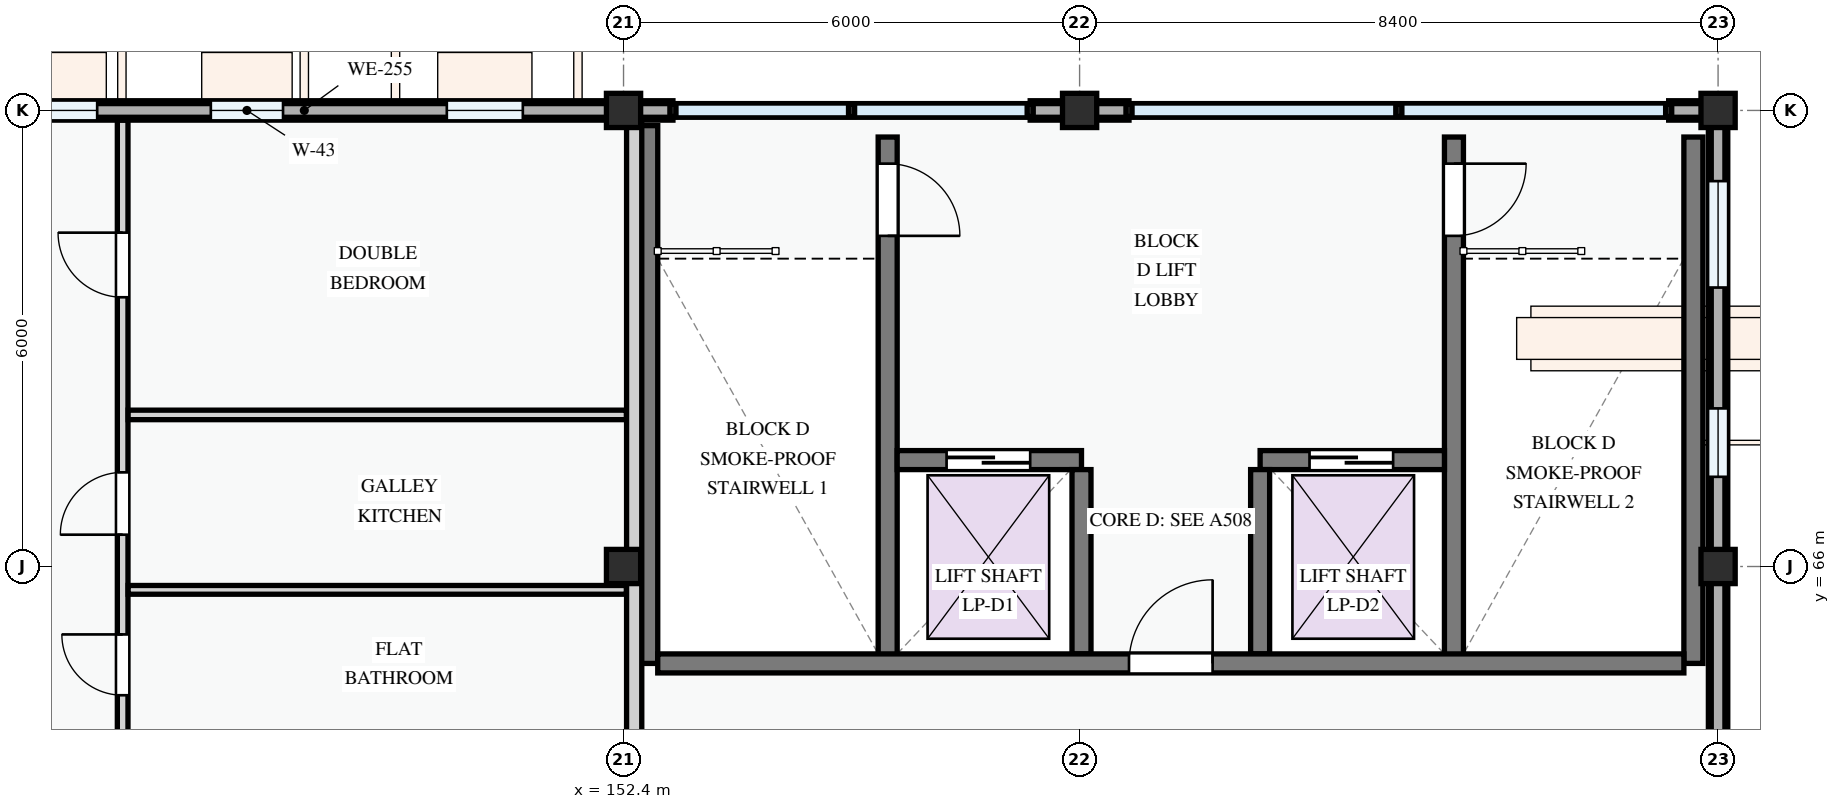
"""IFC4 building model, lengths in metres.
Left out: names, types, materials, properties, quantities, classifications, styles, units other than length and angle.
Written with IfcOpenShell. Run it as: python <this file> out.ifc"""

import sys

from ifc_helpers import new_model, si_unit, direction, frame, frame_2d, origin, origin_2d, place, context, subcontext, project, spatial, polyline, rectangle, outline, extrude, element, fill, save


model = new_model("IFC4")
c1 = context("Model", 3, precision=1e-05, world=origin(), true_north=direction((0.0, 1.0)))
c2 = subcontext(c1, "Body", "Model", "MODEL_VIEW")
j1 = project(units=[si_unit("LENGTHUNIT", "METRE"), si_unit("PLANEANGLEUNIT", "RADIAN")], contexts=[c1])
p1 = place(None, origin())
s1 = spatial("IfcSite", under=j1, at=p1, CompositionType="ELEMENT")
p2 = place(p1, origin())
s2 = spatial("IfcBuilding", under=s1, at=p2, CompositionType="ELEMENT")
p3 = place(p2, frame((0.0, 0.0, 27.9)))
s3 = spatial("IfcBuildingStorey", under=s2, at=p3, CompositionType="ELEMENT", Elevation=27.9)
for number, where, z_axis, x_axis in (
    (1, (152.4, 66.0, 0.0), (0.0, 0.0, 1.0), (1.0, 0.0, 0.0)),
    (2, (152.4, 72.0, 0.0), (0.0, 0.0, 1.0), (1.0, 0.0, 0.0)),
    (3, (158.4, 72.0, 0.0), (0.0, 0.0, 1.0), (1.0, 0.0, 0.0)),
    (4, (166.8, 66.0, 0.0), (0.0, 0.0, 1.0), (1.0, 0.0, 0.0)),
    (5, (166.8, 72.0, 0.0), (0.0, 0.0, 1.0), (1.0, 0.0, 0.0)),
):
    element("IfcColumn", number, at=place(p3, frame(where, z_axis=z_axis, x_axis=x_axis)), inside=s3, PredefinedType="COLUMN", context=c2, shape_type="SweptSolid", body=[
        extrude(rectangle(XDim=0.45, YDim=0.45, at=origin_2d()), origin(), (0.0, 0.0, 1.0), 3.3),
    ])
p4 = place(p3, frame((152.4, 72.0, 0.0), z_axis=(0.0, 0.0, 1.0), x_axis=(-1.0, 0.0, 0.0)))
e6 = element("IfcWall", 6, at=p4, inside=s3, PredefinedType="STANDARD", context=c2, shape_type="SweptSolid", body=[
    extrude(rectangle(XDim=8.4, YDim=0.255, at=frame_2d((4.2, 0.0))), origin(), (0.0, 0.0, 1.0), 2.375),
])
p5 = place(p4, frame((1.325, 0.0, 0.78)))
e7 = element("IfcOpeningElement", 7, at=p5, cuts=e6, PredefinedType="OPENING", context=c2, shape_type="SweptSolid", body=[
    extrude(rectangle(XDim=1.0, YDim=1.25, at=frame_2d((0.5, 0.625))), frame((0.0, 0.137, 0.0), z_axis=(0.0, -1.0, 0.0), x_axis=(1.0, 0.0, 0.0)), (0.0, 0.0, 1.0), 0.275),
])
p6 = place(p4, frame((4.48, 0.0, 0.78)))
e8 = element("IfcOpeningElement", 8, at=p6, cuts=e6, PredefinedType="OPENING", context=c2, shape_type="SweptSolid", body=[
    extrude(rectangle(XDim=0.95, YDim=1.15, at=frame_2d((0.475, 0.575))), frame((0.0, 0.137, 0.0), z_axis=(0.0, -1.0, 0.0), x_axis=(1.0, 0.0, 0.0)), (0.0, 0.0, 1.0), 0.275),
])
p7 = place(p4, frame((6.925, 0.0, 0.78)))
e9 = element("IfcOpeningElement", 9, at=p7, cuts=e6, PredefinedType="OPENING", context=c2, shape_type="SweptSolid", body=[
    extrude(rectangle(XDim=0.95, YDim=1.15, at=frame_2d((0.475, 0.575))), frame((0.0, 0.137, 0.0), z_axis=(0.0, -1.0, 0.0), x_axis=(1.0, 0.0, 0.0)), (0.0, 0.0, 1.0), 0.275),
])
p8 = place(p3, frame((166.8, 57.6, 0.0), z_axis=(0.0, 0.0, 1.0), x_axis=(0.0, 1.0, 0.0)))
e10 = element("IfcWall", 10, at=p8, inside=s3, PredefinedType="STANDARD", context=c2, shape_type="SweptSolid", body=[
    extrude(rectangle(XDim=8.4, YDim=0.255, at=frame_2d((4.2, 0.0))), origin(), (0.0, 0.0, 1.0), 2.345),
])
p9 = place(p8, frame((1.745, 0.0, 0.78)))
e11 = element("IfcOpeningElement", 11, at=p9, cuts=e10, PredefinedType="OPENING", context=c2, shape_type="SweptSolid", body=[
    extrude(rectangle(XDim=0.9, YDim=1.2, at=frame_2d((0.45, 0.6))), frame((0.0, 0.137, 0.0), z_axis=(0.0, -1.0, 0.0), x_axis=(1.0, 0.0, 0.0)), (0.0, 0.0, 1.0), 0.275),
])
p10 = place(p8, frame((5.188, 0.0, 0.78)))
e12 = element("IfcOpeningElement", 12, at=p10, cuts=e10, PredefinedType="OPENING", context=c2, shape_type="SweptSolid", body=[
    extrude(rectangle(XDim=0.95, YDim=1.15, at=frame_2d((0.475, 0.575))), frame((0.0, 0.137, 0.0), z_axis=(0.0, -1.0, 0.0), x_axis=(1.0, 0.0, 0.0)), (0.0, 0.0, 1.0), 0.275),
])
p11 = place(p3, frame((166.8, 66.0, 0.0), z_axis=(0.0, 0.0, 1.0), x_axis=(0.0, 1.0, 0.0)))
e13 = element("IfcWall", 13, at=p11, inside=s3, PredefinedType="STANDARD", context=c2, shape_type="SweptSolid", body=[
    extrude(rectangle(XDim=6.0, YDim=0.255, at=frame_2d((3.0, 0.0))), origin(), (0.0, 0.0, 1.0), 2.445),
])
p12 = place(p11, frame((1.18, 0.0, 0.78)))
e14 = element("IfcOpeningElement", 14, at=p12, cuts=e13, PredefinedType="OPENING", context=c2, shape_type="SweptSolid", body=[
    extrude(rectangle(XDim=0.9, YDim=1.2, at=frame_2d((0.45, 0.6))), frame((0.0, 0.137, 0.0), z_axis=(0.0, -1.0, 0.0), x_axis=(1.0, 0.0, 0.0)), (0.0, 0.0, 1.0), 0.275),
])
p13 = place(p11, frame((3.67, 0.0, 0.78)))
e15 = element("IfcOpeningElement", 15, at=p13, cuts=e13, PredefinedType="OPENING", context=c2, shape_type="SweptSolid", body=[
    extrude(rectangle(XDim=1.4, YDim=1.45, at=frame_2d((0.7, 0.725))), frame((0.0, 0.137, 0.0), z_axis=(0.0, -1.0, 0.0), x_axis=(1.0, 0.0, 0.0)), (0.0, 0.0, 1.0), 0.275),
])
p14 = place(p3, frame((166.67, 72.0, 0.0), z_axis=(0.0, 0.0, 1.0), x_axis=(-1.0, 0.0, 0.0)))
e16 = element("IfcWall", 16, at=p14, inside=s3, PredefinedType="STANDARD", context=c2, shape_type="SweptSolid", body=[
    extrude(rectangle(XDim=0.521, YDim=0.255, at=frame_2d((0.26, 0.0))), origin(), (0.0, 0.0, 1.0), 3.04),
])
p15 = place(p3, frame((159.05, 72.0, 0.0), z_axis=(0.0, 0.0, 1.0), x_axis=(-1.0, 0.0, 0.0)))
e17 = element("IfcWall", 17, at=p15, inside=s3, PredefinedType="STANDARD", context=c2, shape_type="SweptSolid", body=[
    extrude(rectangle(XDim=0.65, YDim=0.255, at=frame_2d((0.325, 0.0))), origin(), (0.0, 0.0, 1.0), 3.04),
])
p16 = place(p3, frame((158.4, 72.0, 0.0), z_axis=(0.0, 0.0, 1.0), x_axis=(-1.0, 0.0, 0.0)))
e18 = element("IfcWall", 18, at=p16, inside=s3, PredefinedType="STANDARD", context=c2, shape_type="SweptSolid", body=[
    extrude(rectangle(XDim=0.65, YDim=0.255, at=frame_2d((0.325, 0.0))), origin(), (0.0, 0.0, 1.0), 3.04),
])
p17 = place(p3, frame((153.05, 72.0, 0.0), z_axis=(0.0, 0.0, 1.0), x_axis=(-1.0, 0.0, 0.0)))
e19 = element("IfcWall", 19, at=p17, inside=s3, PredefinedType="STANDARD", context=c2, shape_type="SweptSolid", body=[
    extrude(rectangle(XDim=0.65, YDim=0.255, at=frame_2d((0.325, 0.0))), origin(), (0.0, 0.0, 1.0), 3.04),
])
p18 = place(p3, frame((152.4, 72.0, 3.3), z_axis=(0.0, 0.0, 1.0), x_axis=(-1.0, 0.0, 0.0)))
e20 = element("IfcWall", 20, at=p18, inside=s3, PredefinedType="PARAPET", context=c2, shape_type="SweptSolid", body=[
    extrude(rectangle(XDim=14.4, YDim=0.18, at=frame_2d((7.2, 0.0))), origin(), (0.0, 0.0, 1.0), 1.15),
])
p19 = place(p3, frame((166.8, 57.6, 3.3), z_axis=(0.0, 0.0, 1.0), x_axis=(0.0, 1.0, 0.0)))
e21 = element("IfcWall", 21, at=p19, inside=s3, PredefinedType="PARAPET", context=c2, shape_type="SweptSolid", body=[
    extrude(outline(polyline([(0.0, 0.0), (8.4, 0.0), (8.4, 1.12), (7.7, 1.322), (7.0, 1.484), (6.3, 1.618), (5.6, 1.718), (4.9, 1.779), (4.2, 1.8), (3.5, 1.779), (2.8, 1.718), (2.1, 1.618), (1.4, 1.484), (0.7, 1.322), (0.0, 1.12), (0.0, 0.0)])), frame((0.0, 0.09, 0.0), z_axis=(0.0, -1.0, 0.0), x_axis=(1.0, 0.0, 0.0)), (0.0, 0.0, 1.0), 0.18),
])
p20 = place(p3, frame((166.8, 66.0, 3.3), z_axis=(0.0, 0.0, 1.0), x_axis=(0.0, 1.0, 0.0)))
e22 = element("IfcWall", 22, at=p20, inside=s3, PredefinedType="PARAPET", context=c2, shape_type="SweptSolid", body=[
    extrude(outline(polyline([(0.0, 0.0), (6.0, 0.0), (6.0, 1.12), (5.5, 1.322), (5.0, 1.484), (4.5, 1.618), (4.0, 1.718), (3.5, 1.779), (3.0, 1.8), (2.5, 1.779), (2.0, 1.718), (1.5, 1.618), (1.0, 1.484), (0.5, 1.322), (0.0, 1.12), (0.0, 0.0)])), frame((0.0, 0.09, 0.0), z_axis=(0.0, -1.0, 0.0), x_axis=(1.0, 0.0, 0.0)), (0.0, 0.0, 1.0), 0.18),
])
p21 = place(p3, frame((166.8, 72.0, 3.3), z_axis=(0.0, 0.0, 1.0), x_axis=(-1.0, 0.0, 0.0)))
e23 = element("IfcWall", 23, at=p21, inside=s3, PredefinedType="PARAPET", context=c2, shape_type="SweptSolid", body=[
    extrude(rectangle(XDim=14.4, YDim=0.18, at=frame_2d((7.2, 0.0))), origin(), (0.0, 0.0, 1.0), 1.15),
])
p22 = place(p3, frame((155.875, 71.65, 0.0), z_axis=(0.0, 0.0, 1.0), x_axis=(0.0, -1.0, 0.0)))
e24 = element("IfcWall", 24, at=p22, inside=s3, PredefinedType="SHEAR", context=c2, shape_type="SweptSolid", body=[
    extrude(rectangle(XDim=6.925, YDim=0.25, at=frame_2d((3.462, 0.0))), origin(), (0.0, 0.0, 1.0), 3.0),
])
p23 = place(p22, frame((0.35, 0.0, 0.0)))
e25 = element("IfcOpeningElement", 25, at=p23, cuts=e24, PredefinedType="OPENING", context=c2, shape_type="SweptSolid", body=[
    extrude(rectangle(XDim=0.95, YDim=2.1, at=frame_2d((0.475, 1.05))), frame((0.0, 0.135, 0.0), z_axis=(0.0, -1.0, 0.0), x_axis=(1.0, 0.0, 0.0)), (0.0, 0.0, 1.0), 0.27),
])
p24 = place(p3, frame((152.725, 71.8, 0.0), z_axis=(0.0, 0.0, 1.0), x_axis=(0.0, -1.0, 0.0)))
e26 = element("IfcWall", 26, at=p24, inside=s3, PredefinedType="SHEAR", context=c2, shape_type="SweptSolid", body=[
    extrude(rectangle(XDim=7.075, YDim=0.25, at=frame_2d((3.538, 0.0))), origin(), (0.0, 0.0, 1.0), 3.0),
])
p25 = place(p3, frame((166.475, 71.65, 0.0), z_axis=(0.0, 0.0, 1.0), x_axis=(0.0, -1.0, 0.0)))
e27 = element("IfcWall", 27, at=p25, inside=s3, PredefinedType="SHEAR", context=c2, shape_type="SweptSolid", body=[
    extrude(rectangle(XDim=6.925, YDim=0.25, at=frame_2d((3.462, 0.0))), origin(), (0.0, 0.0, 1.0), 3.0),
])
p26 = place(p3, frame((163.325, 71.65, 0.0), z_axis=(0.0, 0.0, 1.0), x_axis=(0.0, -1.0, 0.0)))
e28 = element("IfcWall", 28, at=p26, inside=s3, PredefinedType="SHEAR", context=c2, shape_type="SweptSolid", body=[
    extrude(rectangle(XDim=6.925, YDim=0.25, at=frame_2d((3.462, 0.0))), origin(), (0.0, 0.0, 1.0), 3.0),
])
p27 = place(p26, frame((0.35, 0.0, 0.0)))
e29 = element("IfcOpeningElement", 29, at=p27, cuts=e28, PredefinedType="OPENING", context=c2, shape_type="SweptSolid", body=[
    extrude(rectangle(XDim=0.95, YDim=2.1, at=frame_2d((0.475, 1.05))), frame((0.0, 0.135, 0.0), z_axis=(0.0, -1.0, 0.0), x_axis=(1.0, 0.0, 0.0)), (0.0, 0.0, 1.0), 0.27),
])
p28 = place(p3, frame((156.0, 67.4, 0.0), z_axis=(0.0, 0.0, 1.0), x_axis=(1.0, 0.0, 0.0)))
e30 = element("IfcWall", 30, at=p28, inside=s3, PredefinedType="SHEAR", context=c2, shape_type="SweptSolid", body=[
    extrude(rectangle(XDim=2.425, YDim=0.25, at=frame_2d((1.212, 0.0))), origin(), (0.0, 0.0, 1.0), 3.0),
])
p29 = place(p28, frame((0.65, 0.0, 0.0)))
e31 = element("IfcOpeningElement", 31, at=p29, cuts=e30, PredefinedType="OPENING", context=c2, shape_type="SweptSolid", body=[
    extrude(rectangle(XDim=1.1, YDim=2.15, at=frame_2d((0.55, 1.075))), frame((0.0, 0.135, 0.0), z_axis=(0.0, -1.0, 0.0), x_axis=(1.0, 0.0, 0.0)), (0.0, 0.0, 1.0), 0.27),
])
p30 = place(p3, frame((160.775, 67.4, 0.0), z_axis=(0.0, 0.0, 1.0), x_axis=(1.0, 0.0, 0.0)))
e32 = element("IfcWall", 32, at=p30, inside=s3, PredefinedType="SHEAR", context=c2, shape_type="SweptSolid", body=[
    extrude(rectangle(XDim=2.425, YDim=0.25, at=frame_2d((1.212, 0.0))), origin(), (0.0, 0.0, 1.0), 3.0),
])
p31 = place(p30, frame((0.65, 0.0, 0.0)))
e33 = element("IfcOpeningElement", 33, at=p31, cuts=e32, PredefinedType="OPENING", context=c2, shape_type="SweptSolid", body=[
    extrude(rectangle(XDim=1.1, YDim=2.15, at=frame_2d((0.55, 1.075))), frame((0.0, 0.135, 0.0), z_axis=(0.0, -1.0, 0.0), x_axis=(1.0, 0.0, 0.0)), (0.0, 0.0, 1.0), 0.27),
])
for number, where, z_axis, x_axis in (
    (34, (158.425, 67.275, 0.0), (0.0, 0.0, 1.0), (0.0, -1.0, 0.0)),
    (35, (160.775, 67.275, 0.0), (0.0, 0.0, 1.0), (0.0, -1.0, 0.0)),
):
    element("IfcWall", number, at=place(p3, frame(where, z_axis=z_axis, x_axis=x_axis)), inside=s3, PredefinedType="SHEAR", context=c2, shape_type="SweptSolid", body=[
        extrude(rectangle(XDim=2.425, YDim=0.25, at=frame_2d((1.212, 0.0))), origin(), (0.0, 0.0, 1.0), 3.0),
    ])
p32 = place(p3, frame((152.85, 64.725, 0.0), z_axis=(0.0, 0.0, 1.0), x_axis=(1.0, 0.0, 0.0)))
e36 = element("IfcWall", 36, at=p32, inside=s3, PredefinedType="SHEAR", context=c2, shape_type="SweptSolid", body=[
    extrude(rectangle(XDim=13.5, YDim=0.25, at=frame_2d((6.75, 0.0))), origin(), (0.0, 0.0, 1.0), 3.0),
])
p33 = place(p32, frame((6.2, 0.0, 0.0)))
e37 = element("IfcOpeningElement", 37, at=p33, cuts=e36, PredefinedType="OPENING", context=c2, shape_type="SweptSolid", body=[
    extrude(rectangle(XDim=1.1, YDim=2.15, at=frame_2d((0.55, 1.075))), frame((0.0, 0.135, 0.0), z_axis=(0.0, -1.0, 0.0), x_axis=(1.0, 0.0, 0.0)), (0.0, 0.0, 1.0), 0.27),
])
p34 = place(p3, frame((145.81, 63.804, 0.0), z_axis=(0.0, 0.0, 1.0), x_axis=(0.0, 1.0, 0.0)))
e38 = element("IfcWall", 38, at=p34, inside=s3, PredefinedType="PARTITIONING", context=c2, shape_type="SweptSolid", body=[
    extrude(rectangle(XDim=8.066, YDim=0.14, at=frame_2d((4.033, 0.0))), origin(), (0.0, 0.0, 1.0), 3.0),
])
p35 = place(p34, frame((0.502, 0.0, 0.0)))
e39 = element("IfcOpeningElement", 39, at=p35, cuts=e38, PredefinedType="OPENING", context=c2, shape_type="SweptSolid", body=[
    extrude(rectangle(XDim=0.8, YDim=2.1, at=frame_2d((0.4, 1.05))), frame((0.0, 0.08, 0.0), z_axis=(0.0, -1.0, 0.0), x_axis=(1.0, 0.0, 0.0)), (0.0, 0.0, 1.0), 0.16),
])
p36 = place(p34, frame((2.614, 0.0, 0.0)))
e40 = element("IfcOpeningElement", 40, at=p36, cuts=e38, PredefinedType="OPENING", context=c2, shape_type="SweptSolid", body=[
    extrude(rectangle(XDim=0.82, YDim=2.08, at=frame_2d((0.41, 1.04))), frame((0.0, 0.08, 0.0), z_axis=(0.0, -1.0, 0.0), x_axis=(1.0, 0.0, 0.0)), (0.0, 0.0, 1.0), 0.16),
])
p37 = place(p34, frame((5.738, 0.0, 0.0)))
e41 = element("IfcOpeningElement", 41, at=p37, cuts=e38, PredefinedType="OPENING", context=c2, shape_type="SweptSolid", body=[
    extrude(rectangle(XDim=0.85, YDim=2.1, at=frame_2d((0.425, 1.05))), frame((0.0, 0.08, 0.0), z_axis=(0.0, -1.0, 0.0), x_axis=(1.0, 0.0, 0.0)), (0.0, 0.0, 1.0), 0.16),
])
p38 = place(p3, frame((145.882, 67.994, 0.0), z_axis=(0.0, 0.0, 1.0), x_axis=(1.0, 0.0, 0.0)))
e42 = element("IfcWall", 42, at=p38, inside=s3, PredefinedType="PARTITIONING", context=c2, shape_type="SweptSolid", body=[
    extrude(rectangle(XDim=6.556, YDim=0.125, at=frame_2d((3.278, 0.0))), origin(), (0.0, 0.0, 1.0), 3.0),
])
p39 = place(p3, frame((145.882, 65.693, 0.0), z_axis=(0.0, 0.0, 1.0), x_axis=(1.0, 0.0, 0.0)))
e43 = element("IfcWall", 43, at=p39, inside=s3, PredefinedType="PARTITIONING", context=c2, shape_type="SweptSolid", body=[
    extrude(rectangle(XDim=6.556, YDim=0.115, at=frame_2d((3.278, 0.0))), origin(), (0.0, 0.0, 1.0), 2.375),
])
p40 = place(p3, frame((152.54, 63.804, 0.0), z_axis=(0.0, 0.0, 1.0), x_axis=(0.0, 1.0, 0.0)))
e44 = element("IfcWall", 44, at=p40, inside=s3, PredefinedType="PARTITIONING", context=c2, shape_type="SweptSolid", body=[
    extrude(rectangle(XDim=8.066, YDim=0.2, at=frame_2d((4.033, 0.0))), origin(), (0.0, 0.0, 1.0), 2.425),
])
p41 = place(p5, origin())
e45 = element("IfcWindow", 45, at=p41, inside=s3, PartitioningType="SINGLE_PANEL", PredefinedType="WINDOW", context=c2, shape_type="SweptSolid", body=[
    extrude(rectangle(XDim=1.0, YDim=1.25, at=frame_2d((0.5, 0.625))), frame((0.0, 0.03, 0.0), z_axis=(0.0, -1.0, 0.0), x_axis=(1.0, 0.0, 0.0)), (0.0, 0.0, 1.0), 0.06),
])
fill(e7, e45)
p42 = place(p6, origin())
e46 = element("IfcWindow", 46, at=p42, inside=s3, PartitioningType="SINGLE_PANEL", PredefinedType="WINDOW", context=c2, shape_type="SweptSolid", body=[
    extrude(rectangle(XDim=0.95, YDim=1.15, at=frame_2d((0.475, 0.575))), frame((0.0, 0.03, 0.0), z_axis=(0.0, -1.0, 0.0), x_axis=(1.0, 0.0, 0.0)), (0.0, 0.0, 1.0), 0.06),
])
fill(e8, e46)
p43 = place(p7, origin())
e47 = element("IfcWindow", 47, at=p43, inside=s3, PartitioningType="SINGLE_PANEL", PredefinedType="WINDOW", context=c2, shape_type="SweptSolid", body=[
    extrude(rectangle(XDim=0.95, YDim=1.15, at=frame_2d((0.475, 0.575))), frame((0.0, 0.03, 0.0), z_axis=(0.0, -1.0, 0.0), x_axis=(1.0, 0.0, 0.0)), (0.0, 0.0, 1.0), 0.06),
])
fill(e9, e47)
p44 = place(p12, origin())
e48 = element("IfcWindow", 48, at=p44, inside=s3, PartitioningType="SINGLE_PANEL", PredefinedType="WINDOW", context=c2, shape_type="SweptSolid", body=[
    extrude(rectangle(XDim=0.9, YDim=1.2, at=frame_2d((0.45, 0.6))), frame((0.0, 0.03, 0.0), z_axis=(0.0, -1.0, 0.0), x_axis=(1.0, 0.0, 0.0)), (0.0, 0.0, 1.0), 0.06),
])
fill(e14, e48)
p45 = place(p13, origin())
e49 = element("IfcWindow", 49, at=p45, inside=s3, PartitioningType="SINGLE_PANEL", PredefinedType="WINDOW", context=c2, shape_type="SweptSolid", body=[
    extrude(rectangle(XDim=1.4, YDim=1.45, at=frame_2d((0.7, 0.725))), frame((0.0, 0.03, 0.0), z_axis=(0.0, -1.0, 0.0), x_axis=(1.0, 0.0, 0.0)), (0.0, 0.0, 1.0), 0.06),
])
fill(e15, e49)
p46 = place(p23, origin())
e50 = element("IfcDoor", 50, at=p46, inside=s3, OperationType="SINGLE_SWING_RIGHT", PredefinedType="DOOR", context=c2, shape_type="SweptSolid", body=[
    extrude(rectangle(XDim=0.95, YDim=2.1, at=frame_2d((0.475, 1.05))), frame((0.0, 0.025, 0.0), z_axis=(0.0, -1.0, 0.0), x_axis=(1.0, 0.0, 0.0)), (0.0, 0.0, 1.0), 0.05),
])
fill(e25, e50)
p47 = place(p27, origin())
e51 = element("IfcDoor", 51, at=p47, inside=s3, OperationType="SINGLE_SWING_LEFT", PredefinedType="DOOR", context=c2, shape_type="SweptSolid", body=[
    extrude(rectangle(XDim=0.95, YDim=2.1, at=frame_2d((0.475, 1.05))), frame((0.0, 0.025, 0.0), z_axis=(0.0, -1.0, 0.0), x_axis=(1.0, 0.0, 0.0)), (0.0, 0.0, 1.0), 0.05),
])
fill(e29, e51)
p48 = place(p29, origin())
e52 = element("IfcDoor", 52, at=p48, inside=s3, OperationType="SLIDING_TO_LEFT", PredefinedType="DOOR", context=c2, shape_type="SweptSolid", body=[
    extrude(rectangle(XDim=1.1, YDim=2.15, at=frame_2d((0.55, 1.075))), frame((0.0, 0.025, 0.0), z_axis=(0.0, -1.0, 0.0), x_axis=(1.0, 0.0, 0.0)), (0.0, 0.0, 1.0), 0.05),
])
fill(e31, e52)
p49 = place(p31, origin())
e53 = element("IfcDoor", 53, at=p49, inside=s3, OperationType="SLIDING_TO_LEFT", PredefinedType="DOOR", context=c2, shape_type="SweptSolid", body=[
    extrude(rectangle(XDim=1.1, YDim=2.15, at=frame_2d((0.55, 1.075))), frame((0.0, 0.025, 0.0), z_axis=(0.0, -1.0, 0.0), x_axis=(1.0, 0.0, 0.0)), (0.0, 0.0, 1.0), 0.05),
])
fill(e33, e53)
p50 = place(p33, origin())
e54 = element("IfcDoor", 54, at=p50, inside=s3, OperationType="SINGLE_SWING_RIGHT", PredefinedType="DOOR", context=c2, shape_type="SweptSolid", body=[
    extrude(rectangle(XDim=1.1, YDim=2.15, at=frame_2d((0.55, 1.075))), frame((0.0, 0.025, 0.0), z_axis=(0.0, -1.0, 0.0), x_axis=(1.0, 0.0, 0.0)), (0.0, 0.0, 1.0), 0.05),
])
fill(e37, e54)
p51 = place(p35, origin())
e55 = element("IfcDoor", 55, at=p51, inside=s3, OperationType="SINGLE_SWING_RIGHT", PredefinedType="DOOR", context=c2, shape_type="SweptSolid", body=[
    extrude(rectangle(XDim=0.8, YDim=2.1, at=frame_2d((0.4, 1.05))), frame((0.0, 0.025, 0.0), z_axis=(0.0, -1.0, 0.0), x_axis=(1.0, 0.0, 0.0)), (0.0, 0.0, 1.0), 0.05),
])
fill(e39, e55)
p52 = place(p36, origin())
e56 = element("IfcDoor", 56, at=p52, inside=s3, OperationType="SINGLE_SWING_LEFT", PredefinedType="DOOR", context=c2, shape_type="SweptSolid", body=[
    extrude(rectangle(XDim=0.82, YDim=2.08, at=frame_2d((0.41, 1.04))), frame((0.0, 0.025, 0.0), z_axis=(0.0, -1.0, 0.0), x_axis=(1.0, 0.0, 0.0)), (0.0, 0.0, 1.0), 0.05),
])
fill(e40, e56)
p53 = place(p37, origin())
e57 = element("IfcDoor", 57, at=p53, inside=s3, OperationType="SINGLE_SWING_RIGHT", PredefinedType="DOOR", context=c2, shape_type="SweptSolid", body=[
    extrude(rectangle(XDim=0.85, YDim=2.1, at=frame_2d((0.425, 1.05))), frame((0.0, 0.025, 0.0), z_axis=(0.0, -1.0, 0.0), x_axis=(1.0, 0.0, 0.0)), (0.0, 0.0, 1.0), 0.05),
])
fill(e41, e57)
save(model, sys.argv[1])
